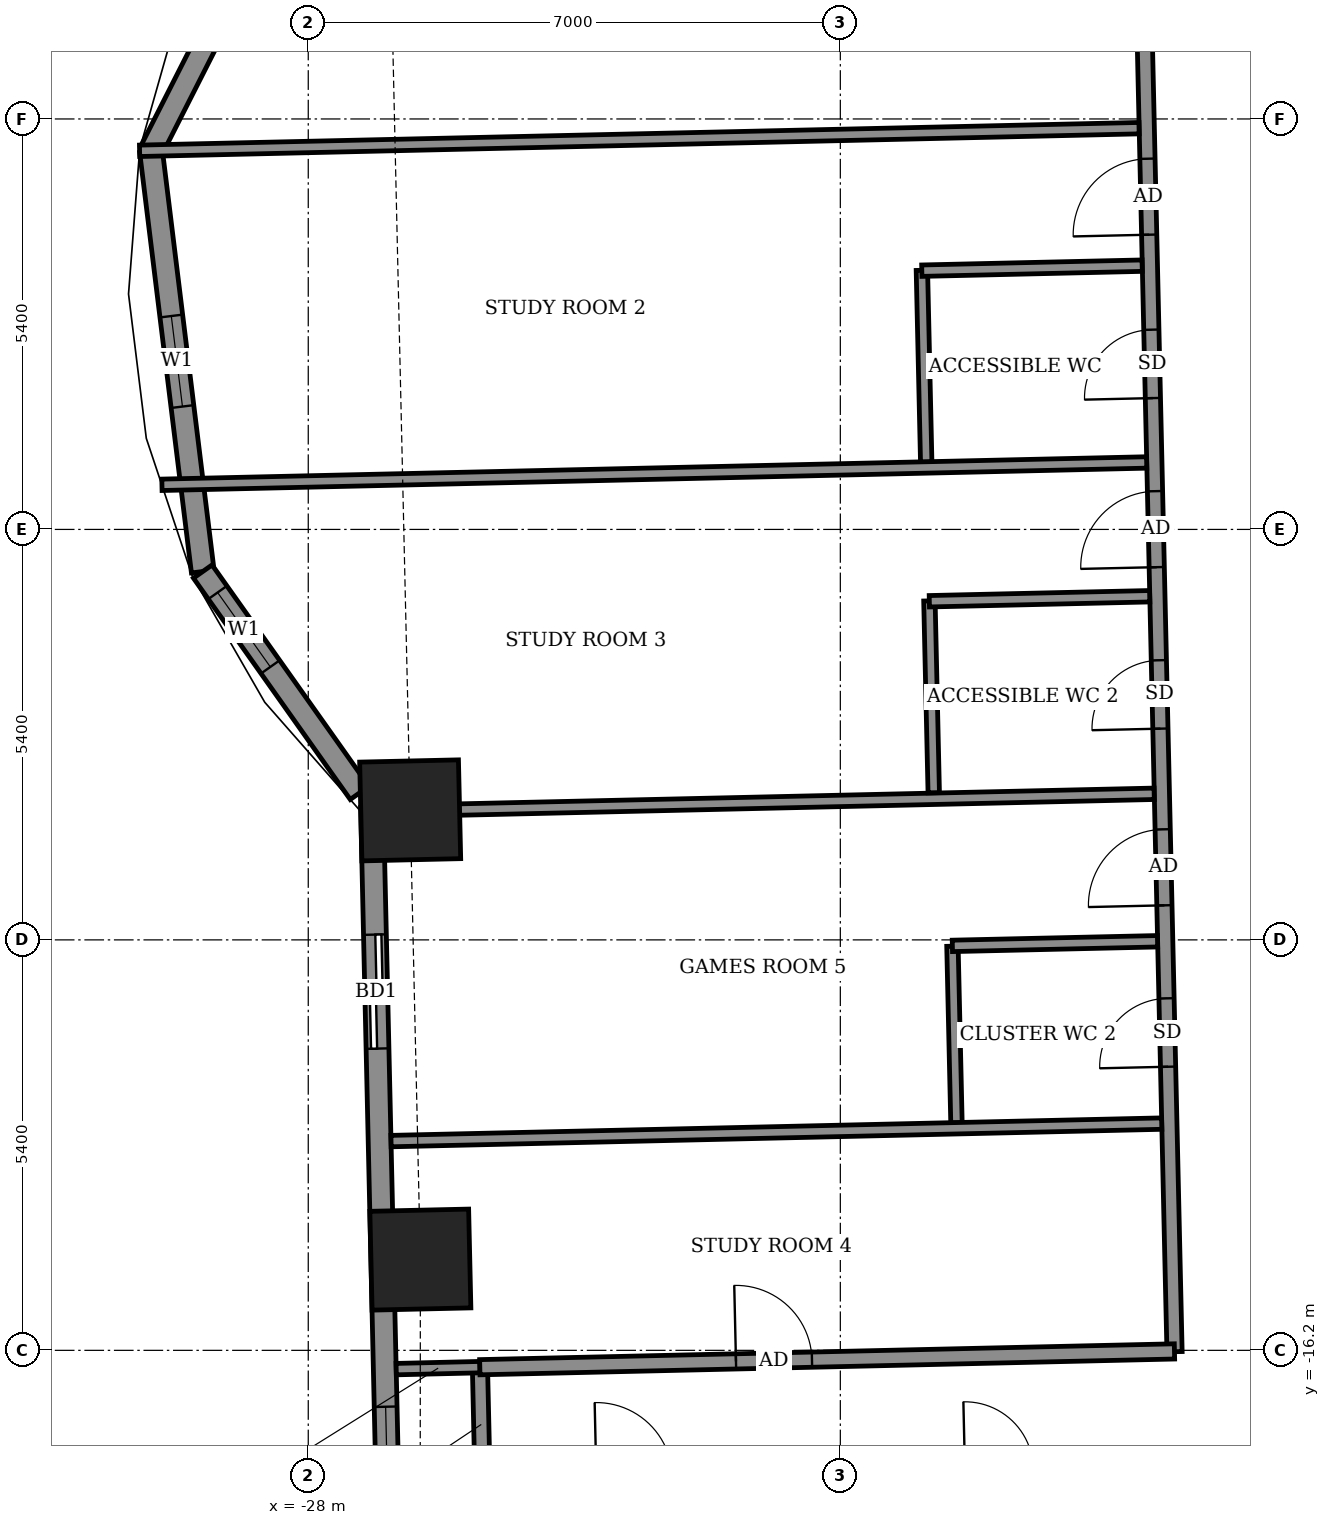
"""IFC4 building model, lengths in metres.
Left out: names, types, materials, properties, quantities, classifications, styles, units other than length and angle.
Written with IfcOpenShell. Run it as: python <this file> out.ifc"""

import sys

from ifc_helpers import new_model, si_unit, direction, frame, frame_2d, origin, origin_2d, place, context, subcontext, project, spatial, rectangle, extrude, element, fill, save


model = new_model("IFC4")
c1 = context("Model", 3, precision=1e-05, world=origin(), true_north=direction((0.0, 1.0)))
c2 = subcontext(c1, "Body", "Model", "MODEL_VIEW")
j1 = project(units=[si_unit("LENGTHUNIT", "METRE"), si_unit("PLANEANGLEUNIT", "RADIAN")], contexts=[c1])
p1 = place(None, origin())
s1 = spatial("IfcSite", under=j1, at=p1, CompositionType="ELEMENT")
p2 = place(p1, origin())
s2 = spatial("IfcBuilding", under=s1, at=p2, CompositionType="ELEMENT")
p3 = place(p2, frame((0.0, 0.0, 140.9)))
s3 = spatial("IfcBuildingStorey", under=s2, at=p3, CompositionType="ELEMENT", Elevation=140.9)
for number, where, z_axis, x_axis in (
    (1, (-26.659, -9.096, -0.55), (0.0, 0.0, 1.0), (0.023, -1.0, 0.0)),
    (2, (-26.525, -15.006, -0.55), (0.0, 0.0, 1.0), (0.023, -1.0, 0.0)),
):
    element("IfcColumn", number, at=place(p3, frame(where, z_axis=z_axis, x_axis=x_axis)), inside=s3, PredefinedType="COLUMN", context=c2, shape_type="SweptSolid", body=[
        extrude(rectangle(XDim=1.3, YDim=1.3, at=origin_2d()), origin(), (0.0, 0.0, 1.0), 3.6),
    ])
p4 = place(p3, frame((-27.625, 4.392, 0.0), z_axis=(0.0, 0.0, 1.0), x_axis=(-0.45268572245, -0.891670138947, 0.0)))
e3 = element("IfcWall", 3, at=p4, inside=s3, PredefinedType="SOLIDWALL", context=c2, shape_type="SweptSolid", body=[
    extrude(rectangle(XDim=5.399, YDim=0.3, at=frame_2d((2.7, 0.0))), origin(), (0.0, 0.0, 1.0), 3.05),
])
p5 = place(p4, frame((2.008, 0.0, 0.9)))
e4 = element("IfcOpeningElement", 4, at=p5, cuts=e3, PredefinedType="OPENING", context=c2, shape_type="SweptSolid", body=[
    extrude(rectangle(XDim=1.2, YDim=1.5, at=frame_2d((0.6, 0.75))), frame((0.0, 0.16, 0.0), z_axis=(0.0, -1.0, 0.0), x_axis=(1.0, 0.0, 0.0)), (0.0, 0.0, 1.0), 0.32),
])
p6 = place(p3, frame((-30.069, -0.422, 0.0), z_axis=(0.0, 0.0, 1.0), x_axis=(0.122206978992, -0.992504636909, 0.0)))
e5 = element("IfcWall", 5, at=p6, inside=s3, PredefinedType="SOLIDWALL", context=c2, shape_type="SweptSolid", body=[
    extrude(rectangle(XDim=5.574, YDim=0.3, at=frame_2d((2.787, 0.0))), origin(), (0.0, 0.0, 1.0), 3.05),
])
p7 = place(p6, frame((2.187, 0.0, 0.9)))
e6 = element("IfcOpeningElement", 6, at=p7, cuts=e5, PredefinedType="OPENING", context=c2, shape_type="SweptSolid", body=[
    extrude(rectangle(XDim=1.2, YDim=1.5, at=frame_2d((0.6, 0.75))), frame((0.0, 0.16, 0.0), z_axis=(0.0, -1.0, 0.0), x_axis=(1.0, 0.0, 0.0)), (0.0, 0.0, 1.0), 0.32),
])
p8 = place(p3, frame((-29.388, -5.954, 0.0), z_axis=(0.0, 0.0, 1.0), x_axis=(0.578095163598, -0.815969351033, 0.0)))
e7 = element("IfcWall", 7, at=p8, inside=s3, PredefinedType="SOLIDWALL", context=c2, shape_type="SweptSolid", body=[
    extrude(rectangle(XDim=3.569, YDim=0.3, at=frame_2d((1.784, 0.0))), origin(), (0.0, 0.0, 1.0), 3.05),
])
p9 = place(p8, frame((0.338, 0.0, 0.9)))
e8 = element("IfcOpeningElement", 8, at=p9, cuts=e7, PredefinedType="OPENING", context=c2, shape_type="SweptSolid", body=[
    extrude(rectangle(XDim=1.2, YDim=1.5, at=frame_2d((0.6, 0.75))), frame((0.0, 0.16, 0.0), z_axis=(0.0, -1.0, 0.0), x_axis=(1.0, 0.0, 0.0)), (0.0, 0.0, 1.0), 0.32),
])
p10 = place(p3, frame((-27.161, -9.052, 0.0), z_axis=(0.0, 0.0, 1.0), x_axis=(0.022665616813, -0.999743101909, 0.0)))
e9 = element("IfcWall", 9, at=p10, inside=s3, PredefinedType="SOLIDWALL", context=c2, shape_type="SweptSolid", body=[
    extrude(rectangle(XDim=11.73, YDim=0.3, at=frame_2d((5.865, 0.0))), origin(), (0.0, 0.0, 1.0), 3.05),
])
p11 = place(p10, frame((1.679, 0.0, 0.0)))
e10 = element("IfcOpeningElement", 10, at=p11, cuts=e9, PredefinedType="OPENING", context=c2, shape_type="SweptSolid", body=[
    extrude(rectangle(XDim=1.5, YDim=2.4, at=frame_2d((0.75, 1.2))), frame((0.0, 0.16, 0.0), z_axis=(0.0, -1.0, 0.0), x_axis=(1.0, 0.0, 0.0)), (0.0, 0.0, 1.0), 0.32),
])
p12 = place(p10, frame((7.892, 0.0, 0.9)))
e11 = element("IfcOpeningElement", 11, at=p12, cuts=e9, PredefinedType="OPENING", context=c2, shape_type="SweptSolid", body=[
    extrude(rectangle(XDim=2.4, YDim=1.5, at=frame_2d((1.2, 0.75))), frame((0.0, 0.16, 0.0), z_axis=(0.0, -1.0, 0.0), x_axis=(1.0, 0.0, 0.0)), (0.0, 0.0, 1.0), 0.32),
])
p13 = place(p3, frame((-29.853, -12.294, 0.0), z_axis=(0.0, 0.0, 1.0), x_axis=(-0.022590224177, 0.999744808324, 0.0)))
e12 = element("IfcWall", 12, at=p13, inside=s3, PredefinedType="USERDEFINED", context=c2, shape_type="SweptSolid", body=[
    extrude(rectangle(XDim=2.875, YDim=0.55, at=frame_2d((1.438, 0.0))), origin(), (0.0, 0.0, 1.0), 0.8),
])
p14 = place(p3, frame((-25.707, -17.925, 0.0), z_axis=(0.0, 0.0, 1.0), x_axis=(-0.022617910375, 0.999744182344, 0.0)))
e13 = element("IfcWall", 13, at=p14, inside=s3, PredefinedType="PARTITIONING", context=c2, shape_type="SweptSolid", body=[
    extrude(rectangle(XDim=1.5, YDim=0.2, at=frame_2d((0.75, 0.0))), origin(), (0.0, 0.0, 1.0), 3.05),
])
p15 = place(p3, frame((-16.603, -16.218, 0.0), z_axis=(0.0, 0.0, 1.0), x_axis=(-0.022698146637, 0.999742363881, 0.0)))
e14 = element("IfcWall", 14, at=p15, inside=s3, PredefinedType="PARTITIONING", context=c2, shape_type="SweptSolid", body=[
    extrude(rectangle(XDim=28.374, YDim=0.2, at=frame_2d((14.187, 0.0))), origin(), (0.0, 0.0, 1.0), 3.05),
])
p16 = place(p15, frame((22.724, 0.0, 0.0)))
e15 = element("IfcOpeningElement", 15, at=p16, cuts=e14, PredefinedType="OPENING", context=c2, shape_type="SweptSolid", body=[
    extrude(rectangle(XDim=1.0, YDim=2.1, at=frame_2d((0.5, 1.05))), frame((0.0, 0.11, 0.0), z_axis=(0.0, -1.0, 0.0), x_axis=(1.0, 0.0, 0.0)), (0.0, 0.0, 1.0), 0.22),
])
p17 = place(p15, frame((18.008, 0.0, 0.0)))
e16 = element("IfcOpeningElement", 16, at=p17, cuts=e14, PredefinedType="OPENING", context=c2, shape_type="SweptSolid", body=[
    extrude(rectangle(XDim=1.0, YDim=2.1, at=frame_2d((0.5, 1.05))), frame((0.0, 0.11, 0.0), z_axis=(0.0, -1.0, 0.0), x_axis=(1.0, 0.0, 0.0)), (0.0, 0.0, 1.0), 0.22),
])
p18 = place(p15, frame((14.699, 0.0, 0.0)))
e17 = element("IfcOpeningElement", 17, at=p18, cuts=e14, PredefinedType="OPENING", context=c2, shape_type="SweptSolid", body=[
    extrude(rectangle(XDim=1.0, YDim=2.1, at=frame_2d((0.5, 1.05))), frame((0.0, 0.11, 0.0), z_axis=(0.0, -1.0, 0.0), x_axis=(1.0, 0.0, 0.0)), (0.0, 0.0, 1.0), 0.22),
])
p19 = place(p15, frame((12.549, 0.0, 0.0)))
e18 = element("IfcOpeningElement", 18, at=p19, cuts=e14, PredefinedType="OPENING", context=c2, shape_type="SweptSolid", body=[
    extrude(rectangle(XDim=0.9, YDim=2.1, at=frame_2d((0.45, 1.05))), frame((0.0, 0.11, 0.0), z_axis=(0.0, -1.0, 0.0), x_axis=(1.0, 0.0, 0.0)), (0.0, 0.0, 1.0), 0.22),
])
p20 = place(p15, frame((10.324, 0.0, 0.0)))
e19 = element("IfcOpeningElement", 19, at=p20, cuts=e14, PredefinedType="OPENING", context=c2, shape_type="SweptSolid", body=[
    extrude(rectangle(XDim=1.0, YDim=2.1, at=frame_2d((0.5, 1.05))), frame((0.0, 0.11, 0.0), z_axis=(0.0, -1.0, 0.0), x_axis=(1.0, 0.0, 0.0)), (0.0, 0.0, 1.0), 0.22),
])
p21 = place(p15, frame((8.199, 0.0, 0.0)))
e20 = element("IfcOpeningElement", 20, at=p21, cuts=e14, PredefinedType="OPENING", context=c2, shape_type="SweptSolid", body=[
    extrude(rectangle(XDim=0.9, YDim=2.1, at=frame_2d((0.45, 1.05))), frame((0.0, 0.11, 0.0), z_axis=(0.0, -1.0, 0.0), x_axis=(1.0, 0.0, 0.0)), (0.0, 0.0, 1.0), 0.22),
])
p22 = place(p15, frame((5.874, 0.0, 0.0)))
e21 = element("IfcOpeningElement", 21, at=p22, cuts=e14, PredefinedType="OPENING", context=c2, shape_type="SweptSolid", body=[
    extrude(rectangle(XDim=1.0, YDim=2.1, at=frame_2d((0.5, 1.05))), frame((0.0, 0.11, 0.0), z_axis=(0.0, -1.0, 0.0), x_axis=(1.0, 0.0, 0.0)), (0.0, 0.0, 1.0), 0.22),
])
p23 = place(p15, frame((3.75, 0.0, 0.0)))
e22 = element("IfcOpeningElement", 22, at=p23, cuts=e14, PredefinedType="OPENING", context=c2, shape_type="SweptSolid", body=[
    extrude(rectangle(XDim=0.9, YDim=2.1, at=frame_2d((0.45, 1.05))), frame((0.0, 0.11, 0.0), z_axis=(0.0, -1.0, 0.0), x_axis=(1.0, 0.0, 0.0)), (0.0, 0.0, 1.0), 0.22),
])
p24 = place(p3, frame((-26.843, -16.447, 0.0), z_axis=(0.0, 0.0, 1.0), x_axis=(0.999720170098, 0.023655475055, 0.0)))
e23 = element("IfcWall", 23, at=p24, inside=s3, PredefinedType="PARTITIONING", context=c2, shape_type="SweptSolid", body=[
    extrude(rectangle(XDim=1.104, YDim=0.15, at=frame_2d((0.552, 0.0))), origin(), (0.0, 0.0, 1.0), 2.55),
])
p25 = place(p3, frame((-25.743, -16.422, 0.0), z_axis=(0.0, 0.0, 1.0), x_axis=(0.999741076645, 0.022754772455, 0.0)))
e24 = element("IfcWall", 24, at=p25, inside=s3, PredefinedType="PARTITIONING", context=c2, shape_type="SweptSolid", body=[
    extrude(rectangle(XDim=9.141, YDim=0.2, at=frame_2d((4.571, 0.0))), origin(), (0.0, 0.0, 1.0), 3.05),
])
p26 = place(p25, frame((3.371, 0.0, 0.0)))
e25 = element("IfcOpeningElement", 25, at=p26, cuts=e24, PredefinedType="OPENING", context=c2, shape_type="SweptSolid", body=[
    extrude(rectangle(XDim=1.0, YDim=2.1, at=frame_2d((0.5, 1.05))), frame((0.0, 0.11, 0.0), z_axis=(0.0, -1.0, 0.0), x_axis=(1.0, 0.0, 0.0)), (0.0, 0.0, 1.0), 0.22),
])
p27 = place(p3, frame((-19.472, -13.207, 0.0), z_axis=(0.0, 0.0, 1.0), x_axis=(-0.02279059109, 0.999740260747, 0.0)))
e26 = element("IfcWall", 26, at=p27, inside=s3, PredefinedType="PARTITIONING", context=c2, shape_type="SweptSolid", body=[
    extrude(rectangle(XDim=2.324, YDim=0.15, at=frame_2d((1.162, 0.0))), origin(), (0.0, 0.0, 1.0), 3.05),
])
p28 = place(p3, frame((-26.911, -13.447, 0.0), z_axis=(0.0, 0.0, 1.0), x_axis=(0.999742841246, 0.022677111331, 0.0)))
e27 = element("IfcWall", 27, at=p28, inside=s3, PredefinedType="PARTITIONING", context=c2, shape_type="SweptSolid", body=[
    extrude(rectangle(XDim=10.142, YDim=0.15, at=frame_2d((5.071, 0.0))), origin(), (0.0, 0.0, 1.0), 2.55),
])
p29 = place(p3, frame((-19.526, -10.879, 0.0), z_axis=(0.0, 0.0, 1.0), x_axis=(0.999746436932, 0.022518033722, 0.0)))
e28 = element("IfcWall", 28, at=p29, inside=s3, PredefinedType="PARTITIONING", context=c2, shape_type="SweptSolid", body=[
    extrude(rectangle(XDim=2.7, YDim=0.15, at=frame_2d((1.35, 0.0))), origin(), (0.0, 0.0, 1.0), 3.05),
])
p30 = place(p3, frame((-27.01, -9.108, 0.0), z_axis=(0.0, 0.0, 1.0), x_axis=(0.999742841246, 0.022677111331, 0.0)))
e29 = element("IfcWall", 29, at=p30, inside=s3, PredefinedType="PARTITIONING", context=c2, shape_type="SweptSolid", body=[
    extrude(rectangle(XDim=10.142, YDim=0.15, at=frame_2d((5.071, 0.0))), origin(), (0.0, 0.0, 1.0), 3.05),
])
p31 = place(p3, frame((-19.771, -8.864, 0.0), z_axis=(0.0, 0.0, 1.0), x_axis=(-0.022532486354, 0.9997461113, 0.0)))
e30 = element("IfcWall", 30, at=p31, inside=s3, PredefinedType="PARTITIONING", context=c2, shape_type="SweptSolid", body=[
    extrude(rectangle(XDim=2.525, YDim=0.15, at=frame_2d((1.262, 0.0))), origin(), (0.0, 0.0, 1.0), 3.05),
])
p32 = place(p3, frame((-19.829, -6.345, 0.0), z_axis=(0.0, 0.0, 1.0), x_axis=(0.999741618182, 0.022730967319, 0.0)))
e31 = element("IfcWall", 31, at=p32, inside=s3, PredefinedType="PARTITIONING", context=c2, shape_type="SweptSolid", body=[
    extrude(rectangle(XDim=2.9, YDim=0.15, at=frame_2d((1.45, 0.0))), origin(), (0.0, 0.0, 1.0), 3.05),
])
p33 = place(p3, frame((-19.87, -4.515, 0.0), z_axis=(0.0, 0.0, 1.0), x_axis=(-0.022532486354, 0.9997461113, 0.0)))
e32 = element("IfcWall", 32, at=p33, inside=s3, PredefinedType="PARTITIONING", context=c2, shape_type="SweptSolid", body=[
    extrude(rectangle(XDim=2.525, YDim=0.15, at=frame_2d((1.262, 0.0))), origin(), (0.0, 0.0, 1.0), 3.05),
])
p34 = place(p3, frame((-29.925, -4.813, 0.0), z_axis=(0.0, 0.0, 1.0), x_axis=(0.999742690772, 0.022683744152, 0.0)))
e33 = element("IfcWall", 33, at=p34, inside=s3, PredefinedType="PARTITIONING", context=c2, shape_type="SweptSolid", body=[
    extrude(rectangle(XDim=12.958, YDim=0.15, at=frame_2d((6.479, 0.0))), origin(), (0.0, 0.0, 1.0), 2.1),
])
p35 = place(p3, frame((-19.928, -1.996, 0.0), z_axis=(0.0, 0.0, 1.0), x_axis=(0.999739657619, 0.022817032779, 0.0)))
e34 = element("IfcWall", 34, at=p35, inside=s3, PredefinedType="PARTITIONING", context=c2, shape_type="SweptSolid", body=[
    extrude(rectangle(XDim=2.9, YDim=0.15, at=frame_2d((1.45, 0.0))), origin(), (0.0, 0.0, 1.0), 3.05),
])
p36 = place(p3, frame((-30.219, -0.419, 0.0), z_axis=(0.0, 0.0, 1.0), x_axis=(0.99974353853, 0.022646349976, 0.0)))
e35 = element("IfcWall", 35, at=p36, inside=s3, PredefinedType="PARTITIONING", context=c2, shape_type="SweptSolid", body=[
    extrude(rectangle(XDim=13.152, YDim=0.15, at=frame_2d((6.576, 0.0))), origin(), (0.0, 0.0, 1.0), 2.1),
])
p37 = place(p7, origin())
e36 = element("IfcWindow", 36, at=p37, inside=s3, PartitioningType="SINGLE_PANEL", PredefinedType="WINDOW", context=c2, shape_type="SweptSolid", body=[
    extrude(rectangle(XDim=1.2, YDim=1.5, at=frame_2d((0.6, 0.75))), frame((0.0, 0.03, 0.0), z_axis=(0.0, -1.0, 0.0), x_axis=(1.0, 0.0, 0.0)), (0.0, 0.0, 1.0), 0.06),
])
fill(e6, e36)
p38 = place(p9, origin())
e37 = element("IfcWindow", 37, at=p38, inside=s3, PartitioningType="SINGLE_PANEL", PredefinedType="WINDOW", context=c2, shape_type="SweptSolid", body=[
    extrude(rectangle(XDim=1.2, YDim=1.5, at=frame_2d((0.6, 0.75))), frame((0.0, 0.03, 0.0), z_axis=(0.0, -1.0, 0.0), x_axis=(1.0, 0.0, 0.0)), (0.0, 0.0, 1.0), 0.06),
])
fill(e8, e37)
p39 = place(p11, origin())
e38 = element("IfcDoor", 38, at=p39, inside=s3, OperationType="SLIDING_TO_LEFT", PredefinedType="DOOR", context=c2, shape_type="SweptSolid", body=[
    extrude(rectangle(XDim=1.5, YDim=2.4, at=frame_2d((0.75, 1.2))), frame((0.0, 0.025, 0.0), z_axis=(0.0, -1.0, 0.0), x_axis=(1.0, 0.0, 0.0)), (0.0, 0.0, 1.0), 0.05),
])
fill(e10, e38)
p40 = place(p12, origin())
e39 = element("IfcWindow", 39, at=p40, inside=s3, PartitioningType="DOUBLE_PANEL_VERTICAL", PredefinedType="WINDOW", context=c2, shape_type="SweptSolid", body=[
    extrude(rectangle(XDim=2.4, YDim=1.5, at=frame_2d((1.2, 0.75))), frame((0.0, 0.03, 0.0), z_axis=(0.0, -1.0, 0.0), x_axis=(1.0, 0.0, 0.0)), (0.0, 0.0, 1.0), 0.06),
])
fill(e11, e39)
p41 = place(p18, origin())
e40 = element("IfcDoor", 40, at=p41, inside=s3, OperationType="SINGLE_SWING_LEFT", PredefinedType="DOOR", context=c2, shape_type="SweptSolid", body=[
    extrude(rectangle(XDim=1.0, YDim=2.1, at=frame_2d((0.5, 1.05))), frame((0.0, 0.025, 0.0), z_axis=(0.0, -1.0, 0.0), x_axis=(1.0, 0.0, 0.0)), (0.0, 0.0, 1.0), 0.05),
])
fill(e17, e40)
p42 = place(p19, origin())
e41 = element("IfcDoor", 41, at=p42, inside=s3, OperationType="SINGLE_SWING_LEFT", PredefinedType="DOOR", context=c2, shape_type="SweptSolid", body=[
    extrude(rectangle(XDim=0.9, YDim=2.1, at=frame_2d((0.45, 1.05))), frame((0.0, 0.025, 0.0), z_axis=(0.0, -1.0, 0.0), x_axis=(1.0, 0.0, 0.0)), (0.0, 0.0, 1.0), 0.05),
])
fill(e18, e41)
p43 = place(p20, origin())
e42 = element("IfcDoor", 42, at=p43, inside=s3, OperationType="SINGLE_SWING_RIGHT", PredefinedType="DOOR", context=c2, shape_type="SweptSolid", body=[
    extrude(rectangle(XDim=1.0, YDim=2.1, at=frame_2d((0.5, 1.05))), frame((0.0, 0.025, 0.0), z_axis=(0.0, -1.0, 0.0), x_axis=(1.0, 0.0, 0.0)), (0.0, 0.0, 1.0), 0.05),
])
fill(e19, e42)
p44 = place(p21, origin())
e43 = element("IfcDoor", 43, at=p44, inside=s3, OperationType="SINGLE_SWING_RIGHT", PredefinedType="DOOR", context=c2, shape_type="SweptSolid", body=[
    extrude(rectangle(XDim=0.9, YDim=2.1, at=frame_2d((0.45, 1.05))), frame((0.0, 0.025, 0.0), z_axis=(0.0, -1.0, 0.0), x_axis=(1.0, 0.0, 0.0)), (0.0, 0.0, 1.0), 0.05),
])
fill(e20, e43)
p45 = place(p22, origin())
e44 = element("IfcDoor", 44, at=p45, inside=s3, OperationType="SINGLE_SWING_LEFT", PredefinedType="DOOR", context=c2, shape_type="SweptSolid", body=[
    extrude(rectangle(XDim=1.0, YDim=2.1, at=frame_2d((0.5, 1.05))), frame((0.0, 0.025, 0.0), z_axis=(0.0, -1.0, 0.0), x_axis=(1.0, 0.0, 0.0)), (0.0, 0.0, 1.0), 0.05),
])
fill(e21, e44)
p46 = place(p23, origin())
e45 = element("IfcDoor", 45, at=p46, inside=s3, OperationType="SINGLE_SWING_LEFT", PredefinedType="DOOR", context=c2, shape_type="SweptSolid", body=[
    extrude(rectangle(XDim=0.9, YDim=2.1, at=frame_2d((0.45, 1.05))), frame((0.0, 0.025, 0.0), z_axis=(0.0, -1.0, 0.0), x_axis=(1.0, 0.0, 0.0)), (0.0, 0.0, 1.0), 0.05),
])
fill(e22, e45)
p47 = place(p26, origin())
e46 = element("IfcDoor", 46, at=p47, inside=s3, OperationType="SINGLE_SWING_RIGHT", PredefinedType="DOOR", context=c2, shape_type="SweptSolid", body=[
    extrude(rectangle(XDim=1.0, YDim=2.1, at=frame_2d((0.5, 1.05))), frame((0.0, 0.025, 0.0), z_axis=(0.0, -1.0, 0.0), x_axis=(1.0, 0.0, 0.0)), (0.0, 0.0, 1.0), 0.05),
])
fill(e25, e46)
save(model, sys.argv[1])
